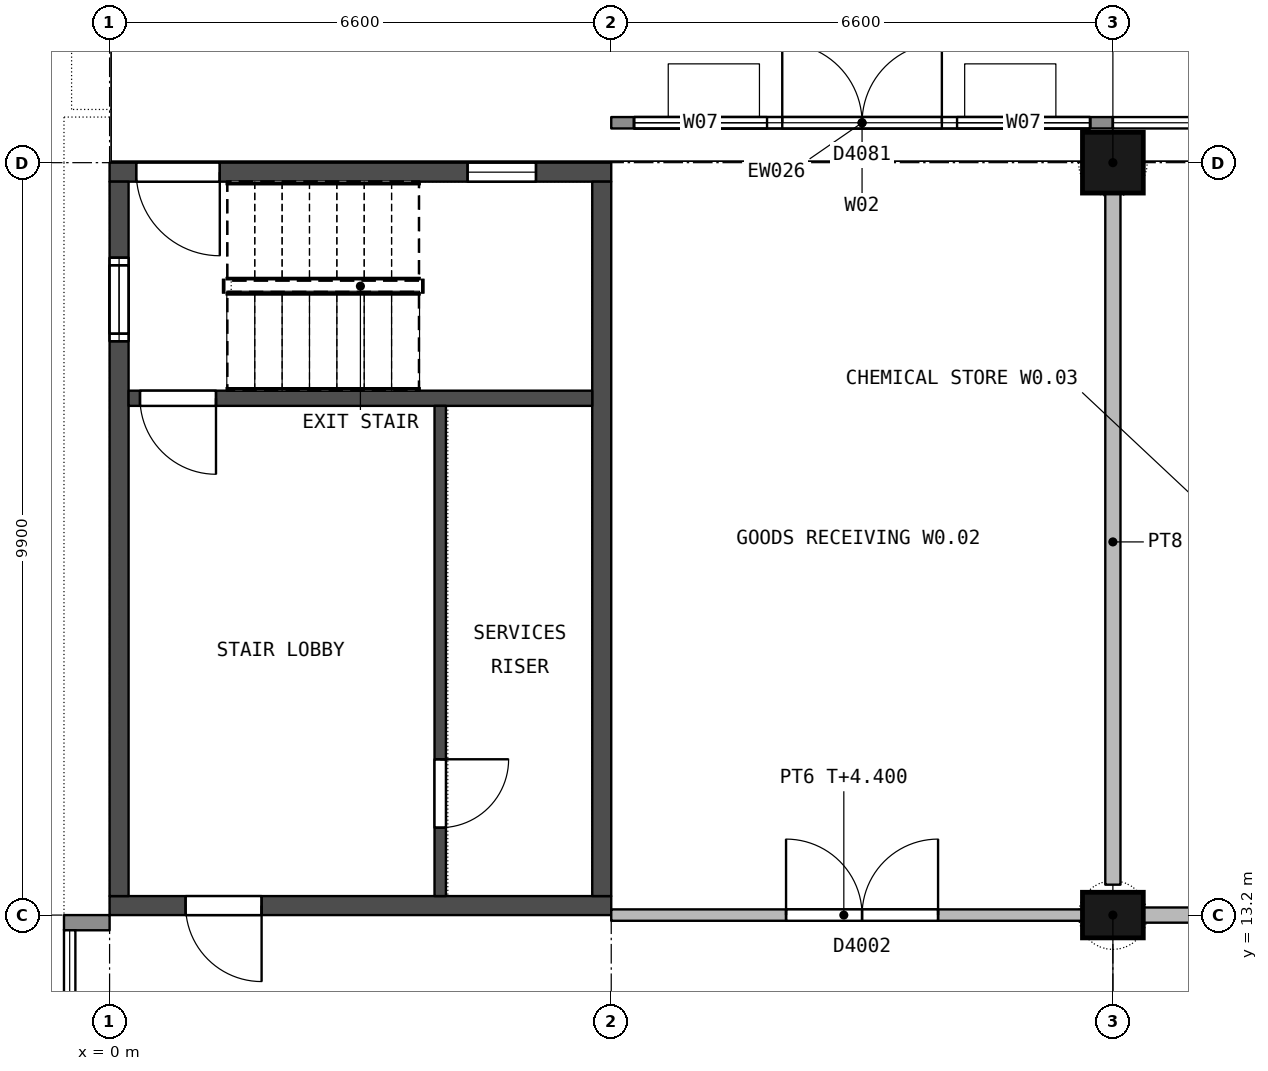
"""IFC4 building model, lengths in metres.
Left out: names, types, materials, properties, quantities, classifications, styles, units other than length and angle.
Written with IfcOpenShell. Run it as: python <this file> out.ifc"""

import sys

from ifc_helpers import new_model, si_unit, direction, frame, frame_2d, origin, origin_2d, place, context, subcontext, project, spatial, rectangle, extrude, element, fill, save


model = new_model("IFC4")
c1 = context("Model", 3, precision=1e-05, world=origin(), true_north=direction((0.0, 1.0)))
c2 = subcontext(c1, "Body", "Model", "MODEL_VIEW")
j1 = project(units=[si_unit("LENGTHUNIT", "METRE"), si_unit("PLANEANGLEUNIT", "RADIAN")], contexts=[c1])
p1 = place(None, origin())
s1 = spatial("IfcSite", under=j1, at=p1, CompositionType="ELEMENT")
p2 = place(p1, origin())
s2 = spatial("IfcBuilding", under=s1, at=p2, CompositionType="ELEMENT")
p3 = place(p2, origin())
s3 = spatial("IfcBuildingStorey", under=s2, at=p3, CompositionType="ELEMENT", Elevation=0.0)
p4 = place(p3, frame((13.2, 13.2, 0.0), z_axis=(0.0, 0.0, 1.0), x_axis=(1.0, 0.0, 0.0)))
e1 = element("IfcColumn", 1, at=p4, inside=s3, PredefinedType="COLUMN", context=c2, shape_type="SweptSolid", body=[
    extrude(rectangle(XDim=0.8, YDim=0.6, at=origin_2d()), origin(), (0.0, 0.0, 1.0), 5.4),
])
p5 = place(p3, frame((13.2, 23.1, 0.0), z_axis=(0.0, 0.0, 1.0), x_axis=(1.0, 0.0, 0.0)))
e2 = element("IfcColumn", 2, at=p5, inside=s3, PredefinedType="COLUMN", context=c2, shape_type="SweptSolid", body=[
    extrude(rectangle(XDim=0.8, YDim=0.8, at=origin_2d()), origin(), (0.0, 0.0, 1.0), 5.4),
])
p6 = place(p3, frame((0.0, 13.325, 0.0), z_axis=(0.0, 0.0, 1.0), x_axis=(1.0, 0.0, 0.0)))
e3 = element("IfcWall", 3, at=p6, inside=s3, PredefinedType="SHEAR", context=c2, shape_type="SweptSolid", body=[
    extrude(rectangle(XDim=6.6, YDim=0.25, at=frame_2d((3.3, 0.0))), origin(), (0.0, 0.0, 1.0), 5.1),
])
p7 = place(p6, frame((1.0, 0.0, 0.0)))
e4 = element("IfcOpeningElement", 4, at=p7, cuts=e3, PredefinedType="OPENING", context=c2, shape_type="SweptSolid", body=[
    extrude(rectangle(XDim=1.0, YDim=2.1, at=frame_2d((0.5, 1.05))), frame((0.0, 0.135, 0.0), z_axis=(0.0, -1.0, 0.0), x_axis=(1.0, 0.0, 0.0)), (0.0, 0.0, 1.0), 0.27),
])
p8 = place(p3, frame((0.0, 22.975, 0.0), z_axis=(0.0, 0.0, 1.0), x_axis=(1.0, 0.0, 0.0)))
e5 = element("IfcWall", 5, at=p8, inside=s3, PredefinedType="SHEAR", context=c2, shape_type="SweptSolid", body=[
    extrude(rectangle(XDim=6.6, YDim=0.25, at=frame_2d((3.3, 0.0))), origin(), (0.0, 0.0, 1.0), 5.1),
])
p9 = place(p8, frame((0.35, 0.0, 0.0)))
e6 = element("IfcOpeningElement", 6, at=p9, cuts=e5, PredefinedType="OPENING", context=c2, shape_type="SweptSolid", body=[
    extrude(rectangle(XDim=1.1, YDim=2.4, at=frame_2d((0.55, 1.2))), frame((0.0, 0.135, 0.0), z_axis=(0.0, -1.0, 0.0), x_axis=(1.0, 0.0, 0.0)), (0.0, 0.0, 1.0), 0.27),
])
p10 = place(p8, frame((4.71, 0.0, 2.05)))
e7 = element("IfcOpeningElement", 7, at=p10, cuts=e5, PredefinedType="OPENING", context=c2, shape_type="SweptSolid", body=[
    extrude(rectangle(XDim=0.9, YDim=1.2, at=frame_2d((0.45, 0.6))), frame((0.0, 0.135, 0.0), z_axis=(0.0, -1.0, 0.0), x_axis=(1.0, 0.0, 0.0)), (0.0, 0.0, 1.0), 0.27),
])
p11 = place(p3, frame((0.125, 13.45, 0.0), z_axis=(0.0, 0.0, 1.0), x_axis=(0.0, 1.0, 0.0)))
e8 = element("IfcWall", 8, at=p11, inside=s3, PredefinedType="SHEAR", context=c2, shape_type="SweptSolid", body=[
    extrude(rectangle(XDim=9.4, YDim=0.25, at=frame_2d((4.7, 0.0))), origin(), (0.0, 0.0, 1.0), 5.1),
])
p12 = place(p11, frame((7.3, 0.0, 0.7)))
e9 = element("IfcOpeningElement", 9, at=p12, cuts=e8, PredefinedType="OPENING", context=c2, shape_type="SweptSolid", body=[
    extrude(rectangle(XDim=1.1, YDim=1.5, at=frame_2d((0.55, 0.75))), frame((0.0, 0.135, 0.0), z_axis=(0.0, -1.0, 0.0), x_axis=(1.0, 0.0, 0.0)), (0.0, 0.0, 1.0), 0.27),
])
p13 = place(p11, frame((7.4, 0.0, 3.4)))
e10 = element("IfcOpeningElement", 10, at=p13, cuts=e8, PredefinedType="OPENING", context=c2, shape_type="SweptSolid", body=[
    extrude(rectangle(XDim=0.9, YDim=1.2, at=frame_2d((0.45, 0.6))), frame((0.0, 0.135, 0.0), z_axis=(0.0, -1.0, 0.0), x_axis=(1.0, 0.0, 0.0)), (0.0, 0.0, 1.0), 0.27),
])
p14 = place(p3, frame((6.475, 13.45, 0.0), z_axis=(0.0, 0.0, 1.0), x_axis=(0.0, 1.0, 0.0)))
e11 = element("IfcWall", 11, at=p14, inside=s3, PredefinedType="SHEAR", context=c2, shape_type="SweptSolid", body=[
    extrude(rectangle(XDim=9.4, YDim=0.25, at=frame_2d((4.7, 0.0))), origin(), (0.0, 0.0, 1.0), 5.1),
])
p15 = place(p3, frame((0.25, 20.0, 0.0), z_axis=(0.0, 0.0, 1.0), x_axis=(1.0, 0.0, 0.0)))
e12 = element("IfcWall", 12, at=p15, inside=s3, PredefinedType="SHEAR", context=c2, shape_type="SweptSolid", body=[
    extrude(rectangle(XDim=6.1, YDim=0.2, at=frame_2d((3.05, 0.0))), origin(), (0.0, 0.0, 1.0), 5.1),
])
p16 = place(p15, frame((0.15, 0.0, 0.0)))
e13 = element("IfcOpeningElement", 13, at=p16, cuts=e12, PredefinedType="OPENING", context=c2, shape_type="SweptSolid", body=[
    extrude(rectangle(XDim=1.0, YDim=2.1, at=frame_2d((0.5, 1.05))), frame((0.0, 0.11, 0.0), z_axis=(0.0, -1.0, 0.0), x_axis=(1.0, 0.0, 0.0)), (0.0, 0.0, 1.0), 0.22),
])
p17 = place(p3, frame((4.35, 13.45, 0.0), z_axis=(0.0, 0.0, 1.0), x_axis=(0.0, 1.0, 0.0)))
e14 = element("IfcWall", 14, at=p17, inside=s3, PredefinedType="SHEAR", context=c2, shape_type="SweptSolid", body=[
    extrude(rectangle(XDim=6.45, YDim=0.15, at=frame_2d((3.225, 0.0))), origin(), (0.0, 0.0, 1.0), 5.1),
])
p18 = place(p17, frame((0.9, 0.0, 0.0)))
e15 = element("IfcOpeningElement", 15, at=p18, cuts=e14, PredefinedType="OPENING", context=c2, shape_type="SweptSolid", body=[
    extrude(rectangle(XDim=0.9, YDim=2.1, at=frame_2d((0.45, 1.05))), frame((0.0, 0.085, 0.0), z_axis=(0.0, -1.0, 0.0), x_axis=(1.0, 0.0, 0.0)), (0.0, 0.0, 1.0), 0.17),
])
p19 = place(p3, frame((6.6, 23.625, 0.0), z_axis=(0.0, 0.0, 1.0), x_axis=(1.0, 0.0, 0.0)))
e16 = element("IfcWall", 16, at=p19, inside=s3, PredefinedType="STANDARD", context=c2, shape_type="SweptSolid", body=[
    extrude(rectangle(XDim=6.6, YDim=0.15, at=frame_2d((3.3, 0.0))), origin(), (0.0, 0.0, 1.0), 5.1),
])
p20 = place(p19, frame((2.25, 0.0, 0.0)))
e17 = element("IfcOpeningElement", 17, at=p20, cuts=e16, PredefinedType="OPENING", context=c2, shape_type="SweptSolid", body=[
    extrude(rectangle(XDim=2.1, YDim=2.4, at=frame_2d((1.05, 1.2))), frame((0.0, 0.085, 0.0), z_axis=(0.0, -1.0, 0.0), x_axis=(1.0, 0.0, 0.0)), (0.0, 0.0, 1.0), 0.17),
])
p21 = place(p19, frame((0.3, 0.0, 0.1)))
e18 = element("IfcOpeningElement", 18, at=p21, cuts=e16, PredefinedType="OPENING", context=c2, shape_type="SweptSolid", body=[
    extrude(rectangle(XDim=1.75, YDim=2.3, at=frame_2d((0.875, 1.15))), frame((0.0, 0.085, 0.0), z_axis=(0.0, -1.0, 0.0), x_axis=(1.0, 0.0, 0.0)), (0.0, 0.0, 1.0), 0.17),
])
p22 = place(p19, frame((4.55, 0.0, 0.1)))
e19 = element("IfcOpeningElement", 19, at=p22, cuts=e16, PredefinedType="OPENING", context=c2, shape_type="SweptSolid", body=[
    extrude(rectangle(XDim=1.75, YDim=2.3, at=frame_2d((0.875, 1.15))), frame((0.0, 0.085, 0.0), z_axis=(0.0, -1.0, 0.0), x_axis=(1.0, 0.0, 0.0)), (0.0, 0.0, 1.0), 0.17),
])
p23 = place(p19, frame((0.3, 0.0, 2.55)))
e20 = element("IfcOpeningElement", 20, at=p23, cuts=e16, PredefinedType="OPENING", context=c2, shape_type="SweptSolid", body=[
    extrude(rectangle(XDim=6.0, YDim=2.4, at=frame_2d((3.0, 1.2))), frame((0.0, 0.085, 0.0), z_axis=(0.0, -1.0, 0.0), x_axis=(1.0, 0.0, 0.0)), (0.0, 0.0, 1.0), 0.17),
])
p24 = place(p3, frame((0.0, 13.1, 0.0), z_axis=(0.0, 0.0, 1.0), x_axis=(-1.0, 0.0, 0.0)))
e21 = element("IfcWall", 21, at=p24, inside=s3, PredefinedType="STANDARD", context=c2, shape_type="SweptSolid", body=[
    extrude(rectangle(XDim=0.6, YDim=0.2, at=frame_2d((0.3, 0.0))), origin(), (0.0, 0.0, 1.0), 4.4),
])
p25 = place(p3, frame((6.6, 13.2, 0.0), z_axis=(0.0, 0.0, 1.0), x_axis=(1.0, 0.0, 0.0)))
e22 = element("IfcWall", 22, at=p25, inside=s3, PredefinedType="PARTITIONING", context=c2, shape_type="SweptSolid", body=[
    extrude(rectangle(XDim=6.2, YDim=0.15, at=frame_2d((3.1, 0.0))), origin(), (0.0, 0.0, 1.0), 4.4),
])
p26 = place(p25, frame((2.3, 0.0, 0.0)))
e23 = element("IfcOpeningElement", 23, at=p26, cuts=e22, PredefinedType="OPENING", context=c2, shape_type="SweptSolid", body=[
    extrude(rectangle(XDim=2.0, YDim=2.4, at=frame_2d((1.0, 1.2))), frame((0.0, 0.085, 0.0), z_axis=(0.0, -1.0, 0.0), x_axis=(1.0, 0.0, 0.0)), (0.0, 0.0, 1.0), 0.17),
])
p27 = place(p3, frame((16.5, 13.2, 0.0), z_axis=(0.0, 0.0, 1.0), x_axis=(-1.0, 0.0, 0.0)))
e24 = element("IfcWall", 24, at=p27, inside=s3, PredefinedType="PARTITIONING", context=c2, shape_type="SweptSolid", body=[
    extrude(rectangle(XDim=2.9, YDim=0.2, at=frame_2d((1.45, 0.0))), origin(), (0.0, 0.0, 1.0), 4.4),
])
p28 = place(p3, frame((13.2, 13.6, 0.0), z_axis=(0.0, 0.0, 1.0), x_axis=(0.0, 1.0, 0.0)))
e25 = element("IfcWall", 25, at=p28, inside=s3, PredefinedType="PARTITIONING", context=c2, shape_type="SweptSolid", body=[
    extrude(rectangle(XDim=9.1, YDim=0.2, at=frame_2d((4.55, 0.0))), origin(), (0.0, 0.0, 1.0), 4.2),
])
p29 = place(p18, origin())
e26 = element("IfcDoor", 26, at=p29, inside=s3, OperationType="SINGLE_SWING_RIGHT", PredefinedType="DOOR", context=c2, shape_type="SweptSolid", body=[
    extrude(rectangle(XDim=0.9, YDim=2.1, at=frame_2d((0.45, 1.05))), frame((0.0, 0.025, 0.0), z_axis=(0.0, -1.0, 0.0), x_axis=(1.0, 0.0, 0.0)), (0.0, 0.0, 1.0), 0.05),
])
fill(e15, e26)
p30 = place(p7, origin())
e27 = element("IfcDoor", 27, at=p30, inside=s3, OperationType="SINGLE_SWING_RIGHT", PredefinedType="DOOR", context=c2, shape_type="SweptSolid", body=[
    extrude(rectangle(XDim=1.0, YDim=2.1, at=frame_2d((0.5, 1.05))), frame((0.0, 0.025, 0.0), z_axis=(0.0, -1.0, 0.0), x_axis=(1.0, 0.0, 0.0)), (0.0, 0.0, 1.0), 0.05),
])
fill(e4, e27)
p31 = place(p16, origin())
e28 = element("IfcDoor", 28, at=p31, inside=s3, OperationType="SINGLE_SWING_RIGHT", PredefinedType="DOOR", context=c2, shape_type="SweptSolid", body=[
    extrude(rectangle(XDim=1.0, YDim=2.1, at=frame_2d((0.5, 1.05))), frame((0.0, 0.025, 0.0), z_axis=(0.0, -1.0, 0.0), x_axis=(1.0, 0.0, 0.0)), (0.0, 0.0, 1.0), 0.05),
])
fill(e13, e28)
p32 = place(p9, origin())
e29 = element("IfcDoor", 29, at=p32, inside=s3, OperationType="SINGLE_SWING_RIGHT", PredefinedType="DOOR", context=c2, shape_type="SweptSolid", body=[
    extrude(rectangle(XDim=1.1, YDim=2.4, at=frame_2d((0.55, 1.2))), frame((0.0, 0.025, 0.0), z_axis=(0.0, -1.0, 0.0), x_axis=(1.0, 0.0, 0.0)), (0.0, 0.0, 1.0), 0.05),
])
fill(e6, e29)
p33 = place(p10, origin())
e30 = element("IfcWindow", 30, at=p33, inside=s3, PartitioningType="SINGLE_PANEL", PredefinedType="WINDOW", context=c2, shape_type="SweptSolid", body=[
    extrude(rectangle(XDim=0.9, YDim=1.2, at=frame_2d((0.45, 0.6))), frame((0.0, 0.03, 0.0), z_axis=(0.0, -1.0, 0.0), x_axis=(1.0, 0.0, 0.0)), (0.0, 0.0, 1.0), 0.06),
])
fill(e7, e30)
p34 = place(p12, origin())
e31 = element("IfcWindow", 31, at=p34, inside=s3, PartitioningType="SINGLE_PANEL", PredefinedType="WINDOW", context=c2, shape_type="SweptSolid", body=[
    extrude(rectangle(XDim=1.1, YDim=1.5, at=frame_2d((0.55, 0.75))), frame((0.0, 0.03, 0.0), z_axis=(0.0, -1.0, 0.0), x_axis=(1.0, 0.0, 0.0)), (0.0, 0.0, 1.0), 0.06),
])
fill(e9, e31)
p35 = place(p13, origin())
e32 = element("IfcWindow", 32, at=p35, inside=s3, PartitioningType="SINGLE_PANEL", PredefinedType="WINDOW", context=c2, shape_type="SweptSolid", body=[
    extrude(rectangle(XDim=0.9, YDim=1.2, at=frame_2d((0.45, 0.6))), frame((0.0, 0.03, 0.0), z_axis=(0.0, -1.0, 0.0), x_axis=(1.0, 0.0, 0.0)), (0.0, 0.0, 1.0), 0.06),
])
fill(e10, e32)
p36 = place(p20, origin())
e33 = element("IfcDoor", 33, at=p36, inside=s3, OperationType="DOUBLE_DOOR_SINGLE_SWING", PredefinedType="DOOR", context=c2, shape_type="SweptSolid", body=[
    extrude(rectangle(XDim=2.1, YDim=2.4, at=frame_2d((1.05, 1.2))), frame((0.0, 0.025, 0.0), z_axis=(0.0, -1.0, 0.0), x_axis=(1.0, 0.0, 0.0)), (0.0, 0.0, 1.0), 0.05),
])
fill(e17, e33)
p37 = place(p21, origin())
e34 = element("IfcWindow", 34, at=p37, inside=s3, PartitioningType="SINGLE_PANEL", PredefinedType="WINDOW", context=c2, shape_type="SweptSolid", body=[
    extrude(rectangle(XDim=1.75, YDim=2.3, at=frame_2d((0.875, 1.15))), frame((0.0, 0.03, 0.0), z_axis=(0.0, -1.0, 0.0), x_axis=(1.0, 0.0, 0.0)), (0.0, 0.0, 1.0), 0.06),
])
fill(e18, e34)
p38 = place(p22, origin())
e35 = element("IfcWindow", 35, at=p38, inside=s3, PartitioningType="SINGLE_PANEL", PredefinedType="WINDOW", context=c2, shape_type="SweptSolid", body=[
    extrude(rectangle(XDim=1.75, YDim=2.3, at=frame_2d((0.875, 1.15))), frame((0.0, 0.03, 0.0), z_axis=(0.0, -1.0, 0.0), x_axis=(1.0, 0.0, 0.0)), (0.0, 0.0, 1.0), 0.06),
])
fill(e19, e35)
p39 = place(p23, origin())
e36 = element("IfcWindow", 36, at=p39, inside=s3, PartitioningType="SINGLE_PANEL", PredefinedType="WINDOW", context=c2, shape_type="SweptSolid", body=[
    extrude(rectangle(XDim=6.0, YDim=2.4, at=frame_2d((3.0, 1.2))), frame((0.0, 0.03, 0.0), z_axis=(0.0, -1.0, 0.0), x_axis=(1.0, 0.0, 0.0)), (0.0, 0.0, 1.0), 0.06),
])
fill(e20, e36)
p40 = place(p26, origin())
e37 = element("IfcDoor", 37, at=p40, inside=s3, OperationType="DOUBLE_DOOR_SINGLE_SWING", PredefinedType="DOOR", context=c2, shape_type="SweptSolid", body=[
    extrude(rectangle(XDim=2.0, YDim=2.4, at=frame_2d((1.0, 1.2))), frame((0.0, 0.027, 0.0), z_axis=(0.0, -1.0, 0.0), x_axis=(1.0, 0.0, 0.0)), (0.0, 0.0, 1.0), 0.054),
])
fill(e23, e37)
save(model, sys.argv[1])
